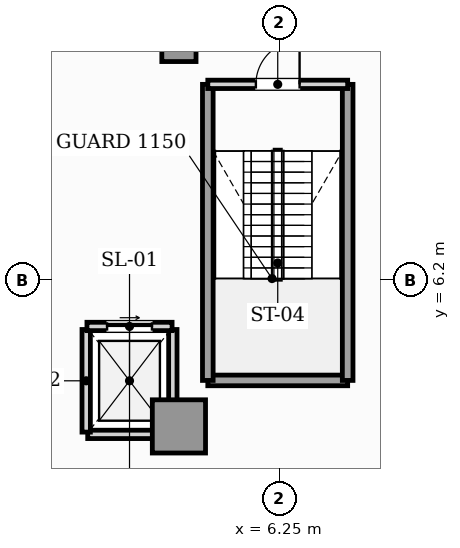
"""IFC4 building model, lengths in metres.
Left out: names, types, materials, properties, quantities, classifications, styles, units other than length and angle.
Written with IfcOpenShell. Run it as: python <this file> out.ifc"""

import sys

from ifc_helpers import new_model, si_unit, direction, frame, frame_2d, origin, origin_2d, place, context, subcontext, project, spatial, rectangle, hollow_rectangle, extrude, element, fill, save


model = new_model("IFC4")
c1 = context("Model", 3, precision=1e-05, world=origin(), true_north=direction((0.0, 1.0)))
c2 = subcontext(c1, "Body", "Model", "MODEL_VIEW")
j1 = project(units=[si_unit("LENGTHUNIT", "METRE"), si_unit("PLANEANGLEUNIT", "RADIAN")], contexts=[c1])
p1 = place(None, origin())
s1 = spatial("IfcSite", under=j1, at=p1, CompositionType="ELEMENT")
p2 = place(p1, origin())
s2 = spatial("IfcBuilding", under=s1, at=p2, CompositionType="ELEMENT")
p3 = place(p2, frame((0.0, 0.0, 5.4)))
s3 = spatial("IfcBuildingStorey", under=s2, at=p3, CompositionType="ELEMENT", Elevation=5.4)
p4 = place(p3, frame((3.6, 2.35, 0.0), z_axis=(0.0, 0.0, 1.0), x_axis=(1.0, 0.0, 0.0)))
e1 = element("IfcColumn", 1, at=p4, inside=s3, PredefinedType="USERDEFINED", context=c2, shape_type="SweptSolid", body=[
    extrude(hollow_rectangle(XDim=1.4, YDim=1.4, WallThickness=0.08, at=origin_2d()), origin(), (0.0, 0.0, 1.0), 4.8),
])
p5 = place(p3, frame((3.6, 12.4, 0.0), z_axis=(0.0, 0.0, 1.0), x_axis=(1.0, 0.0, 0.0)))
e2 = element("IfcColumn", 2, at=p5, inside=s3, PredefinedType="COLUMN", context=c2, shape_type="SweptSolid", body=[
    extrude(rectangle(XDim=0.9, YDim=0.9, at=origin_2d()), origin(), (0.0, 0.0, 1.0), 4.8),
])
p6 = place(p3, frame((1.2, 2.14, 0.0), z_axis=(0.0, 0.0, 1.0), x_axis=(1.0, 0.0, 0.0)))
e3 = element("IfcWall", 3, at=p6, inside=s3, PredefinedType="SOLIDWALL", context=c2, shape_type="SweptSolid", body=[
    extrude(rectangle(XDim=2.2, YDim=0.22, at=frame_2d((1.1, 0.0))), origin(), (0.0, 0.0, 1.0), 4.5),
])
p7 = place(p3, frame((1.16, 2.2, 0.0), z_axis=(0.0, 0.0, 1.0), x_axis=(0.0, 1.0, 0.0)))
e4 = element("IfcWall", 4, at=p7, inside=s3, PredefinedType="SOLIDWALL", context=c2, shape_type="SweptSolid", body=[
    extrude(rectangle(XDim=2.7, YDim=0.22, at=frame_2d((1.35, 0.0))), origin(), (0.0, 0.0, 1.0), 4.5),
])
p8 = place(p3, frame((3.44, 2.2, 0.0), z_axis=(0.0, 0.0, 1.0), x_axis=(0.0, 1.0, 0.0)))
e5 = element("IfcWall", 5, at=p8, inside=s3, PredefinedType="SOLIDWALL", context=c2, shape_type="SweptSolid", body=[
    extrude(rectangle(XDim=2.7, YDim=0.22, at=frame_2d((1.35, 0.0))), origin(), (0.0, 0.0, 1.0), 3.967),
])
p9 = place(p3, frame((1.18, 4.98, 0.0), z_axis=(0.0, 0.0, 1.0), x_axis=(1.0, 0.0, 0.0)))
e6 = element("IfcWall", 6, at=p9, inside=s3, PredefinedType="SOLIDWALL", context=c2, shape_type="SweptSolid", body=[
    extrude(rectangle(XDim=2.24, YDim=0.22, at=frame_2d((1.12, 0.0))), origin(), (0.0, 0.0, 1.0), 4.5),
])
p10 = place(p9, frame((0.53, 0.0, 0.0)))
e7 = element("IfcOpeningElement", 7, at=p10, cuts=e6, PredefinedType="OPENING", context=c2, shape_type="SweptSolid", body=[
    extrude(rectangle(XDim=1.18, YDim=2.2, at=frame_2d((0.59, 1.1))), frame((0.0, 0.12, 0.0), z_axis=(0.0, -1.0, 0.0), x_axis=(1.0, 0.0, 0.0)), (0.0, 0.0, 1.0), 0.24),
])
p11 = place(p3, frame((4.36, 3.56, 0.0), z_axis=(0.0, 0.0, 1.0), x_axis=(1.0, 0.0, 0.0)))
e8 = element("IfcWall", 8, at=p11, inside=s3, PredefinedType="SHEAR", context=c2, shape_type="SweptSolid", body=[
    extrude(rectangle(XDim=3.68, YDim=0.28, at=frame_2d((1.84, 0.0))), origin(), (0.0, 0.0, 1.0), 4.5),
])
for number, where, z_axis, x_axis in (
    (9, (4.36, 3.56, 0.0), (0.0, 0.0, 1.0), (0.0, 1.0, 0.0)),
    (10, (8.04, 3.56, 0.0), (0.0, 0.0, 1.0), (0.0, 1.0, 0.0)),
):
    element("IfcWall", number, at=place(p3, frame(where, z_axis=z_axis, x_axis=x_axis)), inside=s3, PredefinedType="SHEAR", context=c2, shape_type="SweptSolid", body=[
        extrude(rectangle(XDim=7.79, YDim=0.28, at=frame_2d((3.895, 0.0))), origin(), (0.0, 0.0, 1.0), 4.5),
    ])
p12 = place(p3, frame((4.36, 11.35, 0.0), z_axis=(0.0, 0.0, 1.0), x_axis=(1.0, 0.0, 0.0)))
e11 = element("IfcWall", 11, at=p12, inside=s3, PredefinedType="SOLIDWALL", context=c2, shape_type="SweptSolid", body=[
    extrude(rectangle(XDim=3.68, YDim=0.22, at=frame_2d((1.84, 0.0))), origin(), (0.0, 0.0, 1.0), 4.5),
])
p13 = place(p12, frame((1.265, 0.0, 0.0)))
e12 = element("IfcOpeningElement", 12, at=p13, cuts=e11, PredefinedType="OPENING", context=c2, shape_type="SweptSolid", body=[
    extrude(rectangle(XDim=1.15, YDim=2.2, at=frame_2d((0.575, 1.1))), frame((0.0, 0.12, 0.0), z_axis=(0.0, -1.0, 0.0), x_axis=(1.0, 0.0, 0.0)), (0.0, 0.0, 1.0), 0.24),
])
p14 = place(p10, origin())
e13 = element("IfcDoor", 13, at=p14, inside=s3, OperationType="SLIDING_TO_RIGHT", PredefinedType="DOOR", context=c2, shape_type="SweptSolid", body=[
    extrude(rectangle(XDim=1.18, YDim=2.2, at=frame_2d((0.59, 1.1))), frame((0.0, 0.025, 0.0), z_axis=(0.0, -1.0, 0.0), x_axis=(1.0, 0.0, 0.0)), (0.0, 0.0, 1.0), 0.05),
])
fill(e7, e13)
p15 = place(p13, origin())
e14 = element("IfcDoor", 14, at=p15, inside=s3, OperationType="SINGLE_SWING_RIGHT", PredefinedType="DOOR", context=c2, shape_type="SweptSolid", body=[
    extrude(rectangle(XDim=1.15, YDim=2.2, at=frame_2d((0.575, 1.1))), frame((0.0, 0.025, 0.0), z_axis=(0.0, -1.0, 0.0), x_axis=(1.0, 0.0, 0.0)), (0.0, 0.0, 1.0), 0.05),
])
fill(e12, e14)
save(model, sys.argv[1])
